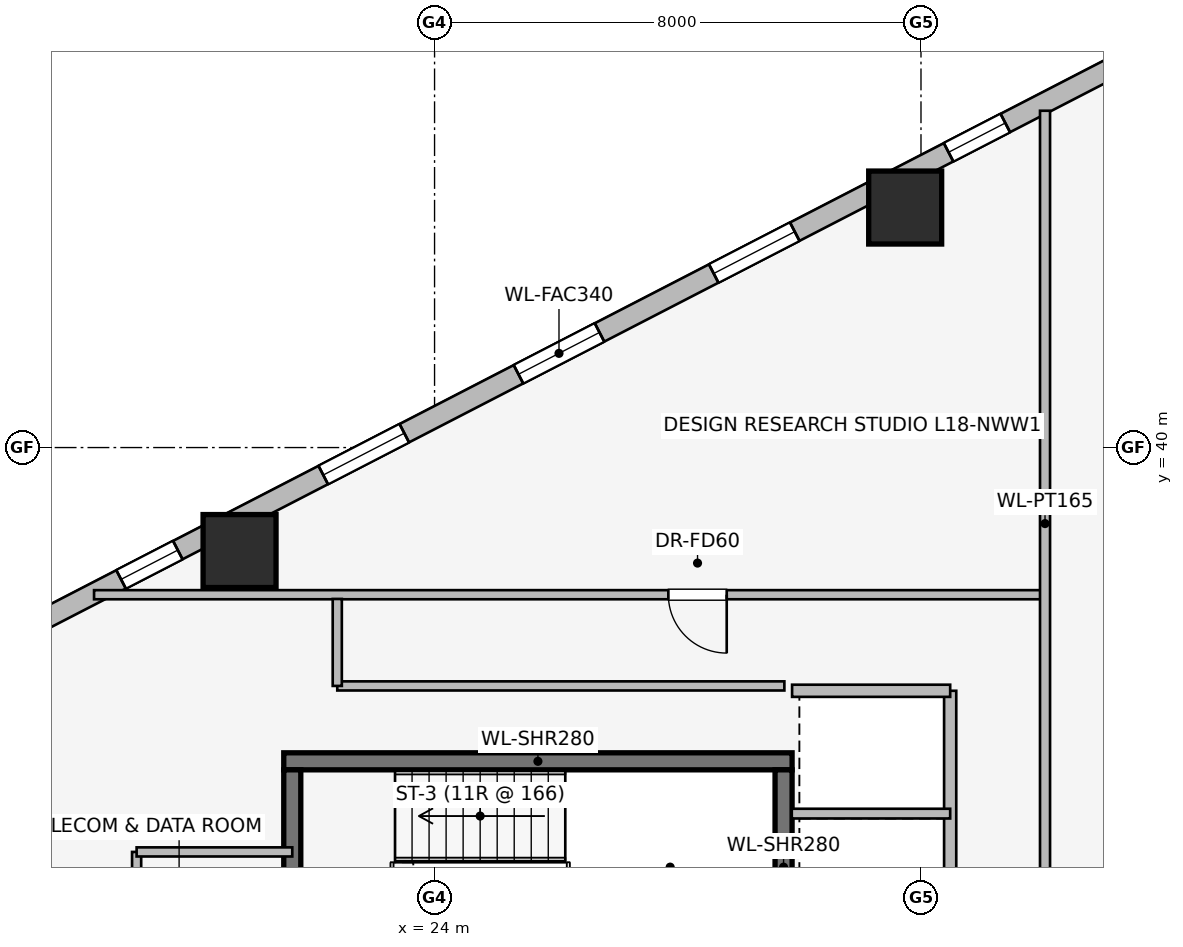
"""IFC4 building model, lengths in metres.
Left out: names, types, materials, properties, quantities, classifications, styles, units other than length and angle.
Written with IfcOpenShell. Run it as: python <this file> out.ifc"""

import sys

from ifc_helpers import new_model, si_unit, direction, frame, frame_2d, origin, origin_2d, place, context, subcontext, project, spatial, rectangle, extrude, element, fill, save


model = new_model("IFC4")
c1 = context("Model", 3, precision=1e-05, world=origin(), true_north=direction((0.0, 1.0)))
c2 = subcontext(c1, "Body", "Model", "MODEL_VIEW")
j1 = project(units=[si_unit("LENGTHUNIT", "METRE"), si_unit("PLANEANGLEUNIT", "RADIAN")], contexts=[c1])
p1 = place(None, origin())
s1 = spatial("IfcSite", under=j1, at=p1, CompositionType="ELEMENT")
p2 = place(p1, origin())
s2 = spatial("IfcBuilding", under=s1, at=p2, CompositionType="ELEMENT")
p3 = place(p2, frame((0.0, 0.0, 70.8)))
s3 = spatial("IfcBuildingStorey", under=s2, at=p3, CompositionType="ELEMENT", Elevation=70.8)
p4 = place(p3, frame((29.88, 34.84, 0.0), z_axis=(0.0, 0.0, 1.0), x_axis=(-1.0, 0.0, 0.0)))
e1 = element("IfcWall", 1, at=p4, inside=s3, PredefinedType="SHEAR", context=c2, shape_type="SweptSolid", body=[
    extrude(rectangle(XDim=8.36, YDim=0.28, at=frame_2d((4.18, 0.0))), origin(), (0.0, 0.0, 1.0), 3.65),
])
for number, where, z_axis, x_axis in (
    (2, (21.66, 34.7, 0.0), (0.0, 0.0, 1.0), (0.0, -1.0, 0.0)),
    (3, (29.74, 31.5, 0.0), (0.0, 0.0, 1.0), (0.0, 1.0, 0.0)),
):
    element("IfcWall", number, at=place(p3, frame(where, z_axis=z_axis, x_axis=x_axis)), inside=s3, PredefinedType="SHEAR", context=c2, shape_type="SweptSolid", body=[
        extrude(rectangle(XDim=3.2, YDim=0.28, at=frame_2d((1.6, 0.0))), origin(), (0.0, 0.0, 1.0), 3.65),
    ])
for number, where, z_axis, x_axis in (
    (4, (31.74, 43.947, 0.0), (0.0, 0.0, 1.0), (1.0, 0.0, 0.0)),
    (5, (20.793, 38.298, 0.0), (0.0, 0.0, 1.0), (1.0, 0.0, 0.0)),
):
    element("IfcColumn", number, at=place(p3, frame(where, z_axis=z_axis, x_axis=x_axis)), inside=s3, PredefinedType="COLUMN", context=c2, shape_type="SweptSolid", body=[
        extrude(rectangle(XDim=1.2, YDim=1.2, at=origin_2d()), origin(), (0.0, 0.0, 1.0), 3.65),
    ])
p5 = place(p3, frame((16.924, 36.841, 0.0), z_axis=(0.0, 0.0, 1.0), x_axis=(0.888634413993, 0.458616264721, 0.0)))
e6 = element("IfcWall", 6, at=p5, inside=s3, PredefinedType="STANDARD", context=c2, shape_type="SweptSolid", body=[
    extrude(rectangle(XDim=20.531, YDim=0.34, at=frame_2d((10.266, 0.0))), origin(), (0.0, 0.0, 1.0), 2.684),
])
p6 = place(p5, frame((2.161, 0.0, 0.75)))
e7 = element("IfcOpeningElement", 7, at=p6, cuts=e6, PredefinedType="OPENING", context=c2, shape_type="SweptSolid", body=[
    extrude(rectangle(XDim=1.05, YDim=1.4, at=frame_2d((0.525, 0.7))), frame((0.0, 0.18, 0.0), z_axis=(0.0, -1.0, 0.0), x_axis=(1.0, 0.0, 0.0)), (0.0, 0.0, 1.0), 0.36),
])
p7 = place(p5, frame((5.903, 0.0, 0.75)))
e8 = element("IfcOpeningElement", 8, at=p7, cuts=e6, PredefinedType="OPENING", context=c2, shape_type="SweptSolid", body=[
    extrude(rectangle(XDim=1.5, YDim=1.5, at=frame_2d((0.75, 0.75))), frame((0.0, 0.18, 0.0), z_axis=(0.0, -1.0, 0.0), x_axis=(1.0, 0.0, 0.0)), (0.0, 0.0, 1.0), 0.36),
])
p8 = place(p5, frame((9.516, 0.0, 0.75)))
e9 = element("IfcOpeningElement", 9, at=p8, cuts=e6, PredefinedType="OPENING", context=c2, shape_type="SweptSolid", body=[
    extrude(rectangle(XDim=1.5, YDim=1.5, at=frame_2d((0.75, 0.75))), frame((0.0, 0.18, 0.0), z_axis=(0.0, -1.0, 0.0), x_axis=(1.0, 0.0, 0.0)), (0.0, 0.0, 1.0), 0.36),
])
p9 = place(p5, frame((13.129, 0.0, 0.75)))
e10 = element("IfcOpeningElement", 10, at=p9, cuts=e6, PredefinedType="OPENING", context=c2, shape_type="SweptSolid", body=[
    extrude(rectangle(XDim=1.5, YDim=1.5, at=frame_2d((0.75, 0.75))), frame((0.0, 0.18, 0.0), z_axis=(0.0, -1.0, 0.0), x_axis=(1.0, 0.0, 0.0)), (0.0, 0.0, 1.0), 0.36),
])
p10 = place(p5, frame((17.476, 0.0, 0.75)))
e11 = element("IfcOpeningElement", 11, at=p10, cuts=e6, PredefinedType="OPENING", context=c2, shape_type="SweptSolid", body=[
    extrude(rectangle(XDim=1.05, YDim=1.4, at=frame_2d((0.525, 0.7))), frame((0.0, 0.18, 0.0), z_axis=(0.0, -1.0, 0.0), x_axis=(1.0, 0.0, 0.0)), (0.0, 0.0, 1.0), 0.36),
])
p11 = place(p3, frame((32.48, 31.95, 0.0), z_axis=(0.0, 0.0, 1.0), x_axis=(0.0, 1.0, 0.0)))
e12 = element("IfcWall", 12, at=p11, inside=s3, PredefinedType="PARTITIONING", context=c2, shape_type="SweptSolid", body=[
    extrude(rectangle(XDim=4.05, YDim=0.2, at=frame_2d((2.025, 0.0))), origin(), (0.0, 0.0, 1.0), 2.513),
])
p12 = place(p3, frame((29.88, 36.0, 0.0), z_axis=(0.0, 0.0, 1.0), x_axis=(1.0, 0.0, 0.0)))
e13 = element("IfcWall", 13, at=p12, inside=s3, PredefinedType="PARTITIONING", context=c2, shape_type="SweptSolid", body=[
    extrude(rectangle(XDim=2.6, YDim=0.2, at=frame_2d((1.3, 0.0))), origin(), (0.0, 0.0, 1.0), 3.39),
])
p13 = place(p3, frame((29.875, 33.98, 0.0), z_axis=(0.0, 0.0, 1.0), x_axis=(1.0, 0.0, 0.0)))
e14 = element("IfcWall", 14, at=p13, inside=s3, PredefinedType="PARTITIONING", context=c2, shape_type="SweptSolid", body=[
    extrude(rectangle(XDim=2.605, YDim=0.16, at=frame_2d((1.302, 0.0))), origin(), (0.0, 0.0, 1.0), 3.39),
])
p14 = place(p3, frame((19.1, 33.35, 0.0), z_axis=(0.0, 0.0, 1.0), x_axis=(0.0, -1.0, 0.0)))
e15 = element("IfcWall", 15, at=p14, inside=s3, PredefinedType="PARTITIONING", context=c2, shape_type="SweptSolid", body=[
    extrude(rectangle(XDim=2.655, YDim=0.15, at=frame_2d((1.328, 0.0))), origin(), (0.0, 0.0, 1.0), 3.39),
])
p15 = place(p3, frame((21.66, 33.35, 0.0), z_axis=(0.0, 0.0, 1.0), x_axis=(-1.0, 0.0, 0.0)))
e16 = element("IfcWall", 16, at=p15, inside=s3, PredefinedType="PARTITIONING", context=c2, shape_type="SweptSolid", body=[
    extrude(rectangle(XDim=2.56, YDim=0.15, at=frame_2d((1.28, 0.0))), origin(), (0.0, 0.0, 1.0), 3.39),
])
p16 = place(p3, frame((34.0, 37.58, 0.0), z_axis=(0.0, 0.0, 1.0), x_axis=(-1.0, 0.0, 0.0)))
e17 = element("IfcWall", 17, at=p16, inside=s3, PredefinedType="PARTITIONING", context=c2, shape_type="SweptSolid", body=[
    extrude(rectangle(XDim=15.6, YDim=0.15, at=frame_2d((7.8, 0.0))), origin(), (0.0, 0.0, 1.0), 3.39),
])
p17 = place(p16, frame((5.195, 0.0, 0.0)))
e18 = element("IfcOpeningElement", 18, at=p17, cuts=e17, PredefinedType="OPENING", context=c2, shape_type="SweptSolid", body=[
    extrude(rectangle(XDim=0.96, YDim=2.0, at=frame_2d((0.48, 1.0))), frame((0.0, 0.085, 0.0), z_axis=(0.0, -1.0, 0.0), x_axis=(1.0, 0.0, 0.0)), (0.0, 0.0, 1.0), 0.17),
])
p18 = place(p3, frame((34.04, 31.96, 0.0), z_axis=(0.0, 0.0, 1.0), x_axis=(0.0, 1.0, 0.0)))
e19 = element("IfcWall", 19, at=p18, inside=s3, PredefinedType="PARTITIONING", context=c2, shape_type="SweptSolid", body=[
    extrude(rectangle(XDim=13.579, YDim=0.165, at=frame_2d((6.79, 0.0))), origin(), (0.0, 0.0, 1.0), 3.39),
])
p19 = place(p3, frame((29.753, 36.08, 0.0), z_axis=(0.0, 0.0, 1.0), x_axis=(-1.0, 0.0, 0.0)))
e20 = element("IfcWall", 20, at=p19, inside=s3, PredefinedType="PARTITIONING", context=c2, shape_type="SweptSolid", body=[
    extrude(rectangle(XDim=7.353, YDim=0.15, at=frame_2d((3.677, 0.0))), origin(), (0.0, 0.0, 1.0), 3.39),
])
p20 = place(p3, frame((22.4, 36.08, 0.0), z_axis=(0.0, 0.0, 1.0), x_axis=(0.0, 1.0, 0.0)))
e21 = element("IfcWall", 21, at=p20, inside=s3, PredefinedType="PARTITIONING", context=c2, shape_type="SweptSolid", body=[
    extrude(rectangle(XDim=1.43, YDim=0.15, at=frame_2d((0.715, 0.0))), origin(), (0.0, 0.0, 1.0), 3.39),
])
p21 = place(p6, origin())
e22 = element("IfcWindow", 22, at=p21, inside=s3, PartitioningType="SINGLE_PANEL", PredefinedType="WINDOW", context=c2, shape_type="SweptSolid", body=[
    extrude(rectangle(XDim=1.05, YDim=1.4, at=frame_2d((0.525, 0.7))), frame((0.0, 0.03, 0.0), z_axis=(0.0, -1.0, 0.0), x_axis=(1.0, 0.0, 0.0)), (0.0, 0.0, 1.0), 0.06),
])
fill(e7, e22)
p22 = place(p7, origin())
e23 = element("IfcWindow", 23, at=p22, inside=s3, PartitioningType="SINGLE_PANEL", PredefinedType="WINDOW", context=c2, shape_type="SweptSolid", body=[
    extrude(rectangle(XDim=1.5, YDim=1.5, at=frame_2d((0.75, 0.75))), frame((0.0, 0.03, 0.0), z_axis=(0.0, -1.0, 0.0), x_axis=(1.0, 0.0, 0.0)), (0.0, 0.0, 1.0), 0.06),
])
fill(e8, e23)
p23 = place(p8, origin())
e24 = element("IfcWindow", 24, at=p23, inside=s3, PartitioningType="SINGLE_PANEL", PredefinedType="WINDOW", context=c2, shape_type="SweptSolid", body=[
    extrude(rectangle(XDim=1.5, YDim=1.5, at=frame_2d((0.75, 0.75))), frame((0.0, 0.03, 0.0), z_axis=(0.0, -1.0, 0.0), x_axis=(1.0, 0.0, 0.0)), (0.0, 0.0, 1.0), 0.06),
])
fill(e9, e24)
p24 = place(p9, origin())
e25 = element("IfcWindow", 25, at=p24, inside=s3, PartitioningType="SINGLE_PANEL", PredefinedType="WINDOW", context=c2, shape_type="SweptSolid", body=[
    extrude(rectangle(XDim=1.5, YDim=1.5, at=frame_2d((0.75, 0.75))), frame((0.0, 0.03, 0.0), z_axis=(0.0, -1.0, 0.0), x_axis=(1.0, 0.0, 0.0)), (0.0, 0.0, 1.0), 0.06),
])
fill(e10, e25)
p25 = place(p10, origin())
e26 = element("IfcWindow", 26, at=p25, inside=s3, PartitioningType="SINGLE_PANEL", PredefinedType="WINDOW", context=c2, shape_type="SweptSolid", body=[
    extrude(rectangle(XDim=1.05, YDim=1.4, at=frame_2d((0.525, 0.7))), frame((0.0, 0.03, 0.0), z_axis=(0.0, -1.0, 0.0), x_axis=(1.0, 0.0, 0.0)), (0.0, 0.0, 1.0), 0.06),
])
fill(e11, e26)
p26 = place(p17, origin())
e27 = element("IfcDoor", 27, at=p26, inside=s3, OperationType="SINGLE_SWING_LEFT", PredefinedType="DOOR", context=c2, shape_type="SweptSolid", body=[
    extrude(rectangle(XDim=0.96, YDim=2.0, at=frame_2d((0.48, 1.0))), frame((0.0, 0.025, 0.0), z_axis=(0.0, -1.0, 0.0), x_axis=(1.0, 0.0, 0.0)), (0.0, 0.0, 1.0), 0.05),
])
fill(e18, e27)
save(model, sys.argv[1])
